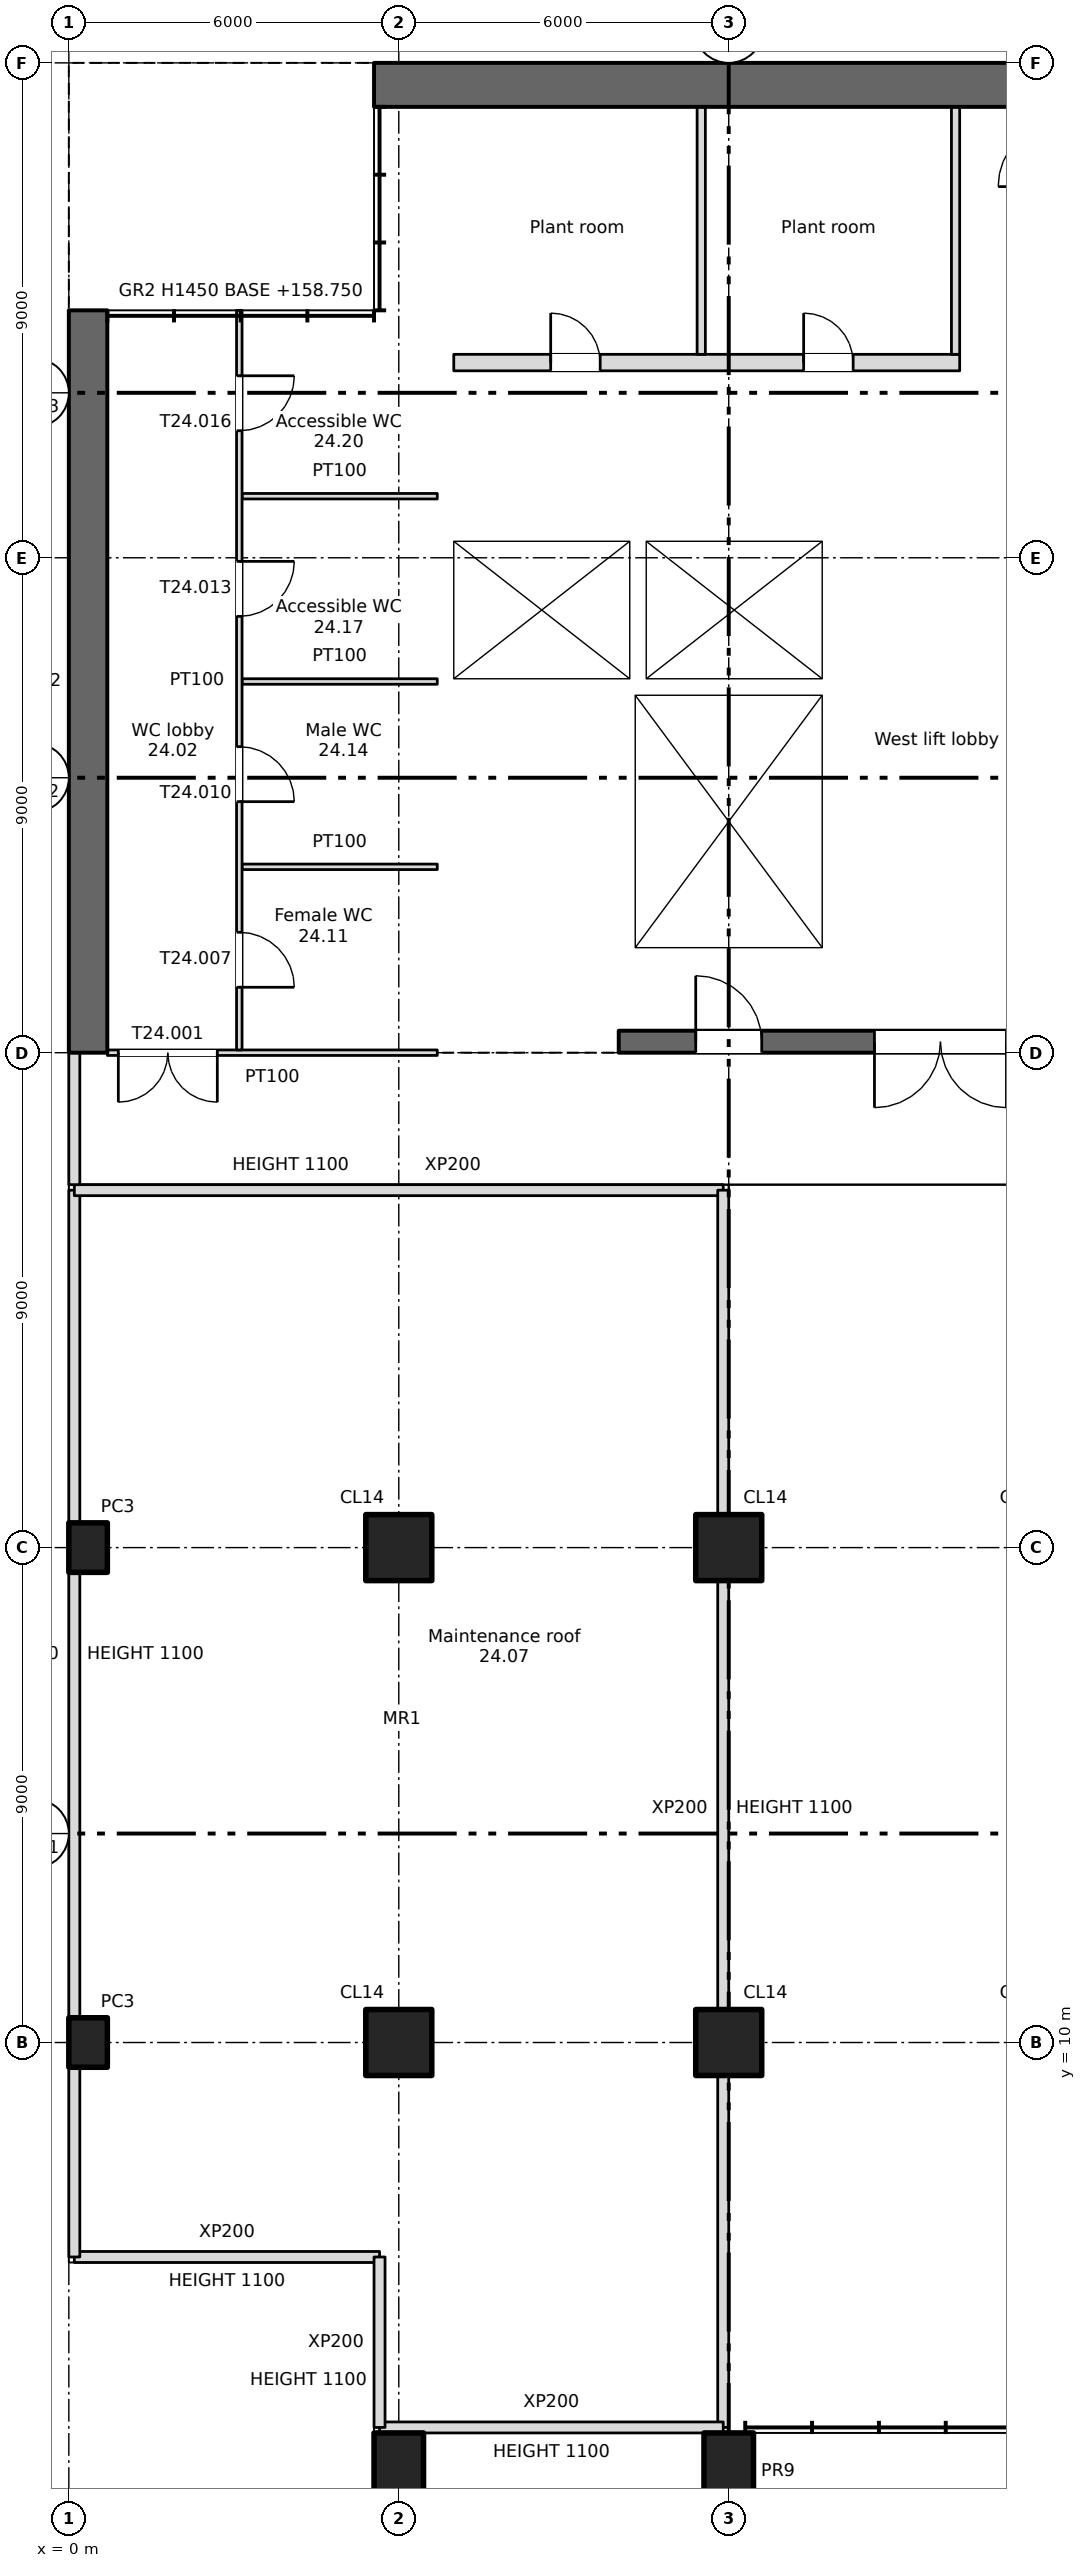
"""IFC4 building model, lengths in metres.
Left out: names, types, materials, properties, quantities, classifications, styles, units other than length and angle.
Written with IfcOpenShell. Run it as: python <this file> out.ifc"""

import sys

from ifc_helpers import new_model, si_unit, direction, frame, frame_2d, origin, origin_2d, place, context, subcontext, project, spatial, rectangle, extrude, element, fill, save


model = new_model("IFC4")
c1 = context("Model", 3, precision=1e-05, world=origin(), true_north=direction((0.0, 1.0)))
c2 = subcontext(c1, "Body", "Model", "MODEL_VIEW")
j1 = project(units=[si_unit("LENGTHUNIT", "METRE"), si_unit("PLANEANGLEUNIT", "RADIAN")], contexts=[c1])
p1 = place(None, origin())
s1 = spatial("IfcSite", under=j1, at=p1, CompositionType="ELEMENT")
p2 = place(p1, origin())
s2 = spatial("IfcBuilding", under=s1, at=p2, CompositionType="ELEMENT")
p3 = place(p2, frame((0.0, 0.0, 158.75)))
s3 = spatial("IfcBuildingStorey", under=s2, at=p3, CompositionType="ELEMENT", Elevation=158.75)
for number, where, z_axis, x_axis in (
    (1, (6.0, 2.2, -0.6), (0.0, 0.0, 1.0), (1.0, 0.0, 0.0)),
    (2, (12.0, 2.2, -0.6), (0.0, 0.0, 1.0), (1.0, 0.0, 0.0)),
):
    element("IfcColumn", number, at=place(p3, frame(where, z_axis=z_axis, x_axis=x_axis)), inside=s3, PredefinedType="COLUMN", context=c2, shape_type="SweptSolid", body=[
        extrude(rectangle(XDim=0.9, YDim=1.4, at=origin_2d()), origin(), (0.0, 0.0, 1.0), 7.8),
    ])
for number, where, z_axis, x_axis in (
    (3, (6.0, 10.0, 0.0), (0.0, 0.0, 1.0), (1.0, 0.0, 0.0)),
    (4, (6.0, 19.0, 0.0), (0.0, 0.0, 1.0), (1.0, 0.0, 0.0)),
    (5, (12.0, 10.0, 0.0), (0.0, 0.0, 1.0), (1.0, 0.0, 0.0)),
    (6, (12.0, 19.0, 0.0), (0.0, 0.0, 1.0), (1.0, 0.0, 0.0)),
):
    element("IfcColumn", number, at=place(p3, frame(where, z_axis=z_axis, x_axis=x_axis)), inside=s3, PredefinedType="COLUMN", context=c2, shape_type="SweptSolid", body=[
        extrude(rectangle(XDim=1.2, YDim=1.2, at=origin_2d()), origin(), (0.0, 0.0, 1.0), 7.2),
    ])
p4 = place(p3, frame((0.35, 28.0, 0.0), z_axis=(0.0, 0.0, 1.0), x_axis=(0.0, 1.0, 0.0)))
e7 = element("IfcWall", 7, at=p4, inside=s3, PredefinedType="SHEAR", context=c2, shape_type="SweptSolid", body=[
    extrude(rectangle(XDim=13.5, YDim=0.7, at=frame_2d((6.75, 0.0))), origin(), (0.0, 0.0, 1.0), 7.2),
])
p5 = place(p3, frame((5.55, 45.6, 0.0), z_axis=(0.0, 0.0, 1.0), x_axis=(1.0, 0.0, 0.0)))
e8 = element("IfcWall", 8, at=p5, inside=s3, PredefinedType="SHEAR", context=c2, shape_type="SweptSolid", body=[
    extrude(rectangle(XDim=60.9, YDim=0.8, at=frame_2d((30.45, 0.0))), origin(), (0.0, 0.0, 1.0), 7.2),
])
for number, where, z_axis, x_axis in (
    (9, (0.35, 10.0, 0.0), (0.0, 0.0, 1.0), (1.0, 0.0, 0.0)),
    (10, (0.35, 19.0, 0.0), (0.0, 0.0, 1.0), (1.0, 0.0, 0.0)),
):
    element("IfcColumn", number, at=place(p3, frame(where, z_axis=z_axis, x_axis=x_axis)), inside=s3, PredefinedType="COLUMN", context=c2, shape_type="SweptSolid", body=[
        extrude(rectangle(XDim=0.7, YDim=0.9, at=origin_2d()), origin(), (0.0, 0.0, 1.0), 7.2),
    ])
p6 = place(p3, frame((6.85, 28.0, 0.0), z_axis=(0.0, 0.0, 1.0), x_axis=(0.0, 1.0, 0.0)))
e11 = element("IfcWall", 11, at=p6, inside=s3, PredefinedType="SHEAR", context=c2, shape_type="SweptSolid", body=[
    extrude(rectangle(XDim=0.4, YDim=0.3, at=frame_2d((0.2, 0.0))), origin(), (0.0, 0.0, 1.0), 7.2),
])
p7 = place(p3, frame((10.0, 28.2, 0.0), z_axis=(0.0, 0.0, 1.0), x_axis=(1.0, 0.0, 0.0)))
e12 = element("IfcWall", 12, at=p7, inside=s3, PredefinedType="SHEAR", context=c2, shape_type="SweptSolid", body=[
    extrude(rectangle(XDim=8.5, YDim=0.4, at=frame_2d((4.25, 0.0))), origin(), (0.0, 0.0, 1.0), 7.2),
])
p8 = place(p7, frame((1.4, 0.0, 0.0)))
e13 = element("IfcOpeningElement", 13, at=p8, cuts=e12, PredefinedType="OPENING", context=c2, shape_type="SweptSolid", body=[
    extrude(rectangle(XDim=1.2, YDim=2.1, at=frame_2d((0.6, 1.05))), frame((0.0, 0.21, 0.0), z_axis=(0.0, -1.0, 0.0), x_axis=(1.0, 0.0, 0.0)), (0.0, 0.0, 1.0), 0.42),
])
p9 = place(p7, frame((4.65, 0.0, 0.0)))
e14 = element("IfcOpeningElement", 14, at=p9, cuts=e12, PredefinedType="OPENING", context=c2, shape_type="SweptSolid", body=[
    extrude(rectangle(XDim=2.4, YDim=2.1, at=frame_2d((1.2, 1.05))), frame((0.0, 0.21, 0.0), z_axis=(0.0, -1.0, 0.0), x_axis=(1.0, 0.0, 0.0)), (0.0, 0.0, 1.0), 0.42),
])
p10 = place(p3, frame((6.85, 28.4, 0.0), z_axis=(0.0, 0.0, 1.0), x_axis=(0.0, 1.0, 0.0)))
e15 = element("IfcWall", 15, at=p10, inside=s3, PredefinedType="SHEAR", context=c2, shape_type="SweptSolid", body=[
    extrude(rectangle(XDim=16.8, YDim=0.3, at=frame_2d((8.4, 0.0))), origin(), (0.0, 0.0, 1.0), 7.2),
])
for number, where, z_axis, x_axis in (
    (16, (10.15, 28.4, 0.0), (0.0, 0.0, 1.0), (0.0, 1.0, 0.0)),
    (17, (13.85, 28.4, 0.0), (0.0, 0.0, 1.0), (0.0, 1.0, 0.0)),
):
    element("IfcWall", number, at=place(p3, frame(where, z_axis=z_axis, x_axis=x_axis)), inside=s3, PredefinedType="SHEAR", context=c2, shape_type="SweptSolid", body=[
        extrude(rectangle(XDim=6.1, YDim=0.3, at=frame_2d((3.05, 0.0))), origin(), (0.0, 0.0, 1.0), 7.2),
    ])
for number, where, z_axis, x_axis in (
    (18, (7.0, 34.65, 0.0), (0.0, 0.0, 1.0), (1.0, 0.0, 0.0)),
    (19, (7.0, 37.45, 0.0), (0.0, 0.0, 1.0), (1.0, 0.0, 0.0)),
):
    element("IfcWall", number, at=place(p3, frame(where, z_axis=z_axis, x_axis=x_axis)), inside=s3, PredefinedType="SHEAR", context=c2, shape_type="SweptSolid", body=[
        extrude(rectangle(XDim=7.0, YDim=0.3, at=frame_2d((3.5, 0.0))), origin(), (0.0, 0.0, 1.0), 7.2),
    ])
p11 = place(p3, frame((13.85, 34.8, 0.0), z_axis=(0.0, 0.0, 1.0), x_axis=(0.0, 1.0, 0.0)))
e20 = element("IfcWall", 20, at=p11, inside=s3, PredefinedType="SHEAR", context=c2, shape_type="SweptSolid", body=[
    extrude(rectangle(XDim=2.5, YDim=0.3, at=frame_2d((1.25, 0.0))), origin(), (0.0, 0.0, 1.0), 7.2),
])
p12 = place(p3, frame((7.0, 40.55, 0.0), z_axis=(0.0, 0.0, 1.0), x_axis=(1.0, 0.0, 0.0)))
e21 = element("IfcWall", 21, at=p12, inside=s3, PredefinedType="PARTITIONING", context=c2, shape_type="SweptSolid", body=[
    extrude(rectangle(XDim=9.2, YDim=0.3, at=frame_2d((4.6, 0.0))), origin(), (0.0, 0.0, 1.0), 7.2),
])
p13 = place(p12, frame((1.762, 0.0, 0.0)))
e22 = element("IfcOpeningElement", 22, at=p13, cuts=e21, PredefinedType="OPENING", context=c2, shape_type="SweptSolid", body=[
    extrude(rectangle(XDim=0.9, YDim=2.1, at=frame_2d((0.45, 1.05))), frame((0.0, 0.16, 0.0), z_axis=(0.0, -1.0, 0.0), x_axis=(1.0, 0.0, 0.0)), (0.0, 0.0, 1.0), 0.32),
])
p14 = place(p12, frame((6.363, 0.0, 0.0)))
e23 = element("IfcOpeningElement", 23, at=p14, cuts=e21, PredefinedType="OPENING", context=c2, shape_type="SweptSolid", body=[
    extrude(rectangle(XDim=0.9, YDim=2.1, at=frame_2d((0.45, 1.05))), frame((0.0, 0.16, 0.0), z_axis=(0.0, -1.0, 0.0), x_axis=(1.0, 0.0, 0.0)), (0.0, 0.0, 1.0), 0.32),
])
p15 = place(p3, frame((10.35, 34.8, 0.0), z_axis=(0.0, 0.0, 1.0), x_axis=(0.0, 1.0, 0.0)))
e24 = element("IfcWall", 24, at=p15, inside=s3, PredefinedType="SHEAR", context=c2, shape_type="SweptSolid", body=[
    extrude(rectangle(XDim=2.5, YDim=0.3, at=frame_2d((1.25, 0.0))), origin(), (0.0, 0.0, 1.0), 7.2),
])
for number, where, z_axis, x_axis in (
    (25, (16.125, 40.7, 0.0), (0.0, 0.0, 1.0), (0.0, 1.0, 0.0)),
    (26, (11.5, 40.7, 0.0), (0.0, 0.0, 1.0), (0.0, 1.0, 0.0)),
):
    element("IfcWall", number, at=place(p3, frame(where, z_axis=z_axis, x_axis=x_axis)), inside=s3, PredefinedType="PARTITIONING", context=c2, shape_type="SweptSolid", body=[
        extrude(rectangle(XDim=4.5, YDim=0.15, at=frame_2d((2.25, 0.0))), origin(), (0.0, 0.0, 1.0), 7.2),
    ])
p16 = place(p3, frame((0.7, 28.0, 0.0), z_axis=(0.0, 0.0, 1.0), x_axis=(1.0, 0.0, 0.0)))
e27 = element("IfcWall", 27, at=p16, inside=s3, PredefinedType="PARTITIONING", context=c2, shape_type="SweptSolid", body=[
    extrude(rectangle(XDim=6.0, YDim=0.1, at=frame_2d((3.0, 0.0))), origin(), (0.0, 0.0, 1.0), 7.2),
])
p17 = place(p16, frame((0.2, 0.0, 0.0)))
e28 = element("IfcOpeningElement", 28, at=p17, cuts=e27, PredefinedType="OPENING", context=c2, shape_type="SweptSolid", body=[
    extrude(rectangle(XDim=1.8, YDim=2.1, at=frame_2d((0.9, 1.05))), frame((0.0, 0.06, 0.0), z_axis=(0.0, -1.0, 0.0), x_axis=(1.0, 0.0, 0.0)), (0.0, 0.0, 1.0), 0.12),
])
for number, where, z_axis, x_axis in (
    (29, (3.15, 31.38, 0.0), (0.0, 0.0, 1.0), (1.0, 0.0, 0.0)),
    (30, (3.15, 34.75, 0.0), (0.0, 0.0, 1.0), (1.0, 0.0, 0.0)),
    (31, (3.15, 38.12, 0.0), (0.0, 0.0, 1.0), (1.0, 0.0, 0.0)),
):
    element("IfcWall", number, at=place(p3, frame(where, z_axis=z_axis, x_axis=x_axis)), inside=s3, PredefinedType="PARTITIONING", context=c2, shape_type="SweptSolid", body=[
        extrude(rectangle(XDim=3.55, YDim=0.1, at=frame_2d((1.775, 0.0))), origin(), (0.0, 0.0, 1.0), 7.2),
    ])
p18 = place(p3, frame((3.1, 28.05, 0.0), z_axis=(0.0, 0.0, 1.0), x_axis=(0.0, 1.0, 0.0)))
e32 = element("IfcWall", 32, at=p18, inside=s3, PredefinedType="PARTITIONING", context=c2, shape_type="SweptSolid", body=[
    extrude(rectangle(XDim=13.45, YDim=0.1, at=frame_2d((6.725, 0.0))), origin(), (0.0, 0.0, 1.0), 7.2),
])
p19 = place(p18, frame((1.14, 0.0, 0.0)))
e33 = element("IfcOpeningElement", 33, at=p19, cuts=e32, PredefinedType="OPENING", context=c2, shape_type="SweptSolid", body=[
    extrude(rectangle(XDim=1.0, YDim=2.1, at=frame_2d((0.5, 1.05))), frame((0.0, 0.06, 0.0), z_axis=(0.0, -1.0, 0.0), x_axis=(1.0, 0.0, 0.0)), (0.0, 0.0, 1.0), 0.12),
])
p20 = place(p18, frame((4.515, 0.0, 0.0)))
e34 = element("IfcOpeningElement", 34, at=p20, cuts=e32, PredefinedType="OPENING", context=c2, shape_type="SweptSolid", body=[
    extrude(rectangle(XDim=1.0, YDim=2.1, at=frame_2d((0.5, 1.05))), frame((0.0, 0.06, 0.0), z_axis=(0.0, -1.0, 0.0), x_axis=(1.0, 0.0, 0.0)), (0.0, 0.0, 1.0), 0.12),
])
p21 = place(p18, frame((7.885, 0.0, 0.0)))
e35 = element("IfcOpeningElement", 35, at=p21, cuts=e32, PredefinedType="OPENING", context=c2, shape_type="SweptSolid", body=[
    extrude(rectangle(XDim=1.0, YDim=2.1, at=frame_2d((0.5, 1.05))), frame((0.0, 0.06, 0.0), z_axis=(0.0, -1.0, 0.0), x_axis=(1.0, 0.0, 0.0)), (0.0, 0.0, 1.0), 0.12),
])
p22 = place(p18, frame((11.26, 0.0, 0.0)))
e36 = element("IfcOpeningElement", 36, at=p22, cuts=e32, PredefinedType="OPENING", context=c2, shape_type="SweptSolid", body=[
    extrude(rectangle(XDim=1.0, YDim=2.1, at=frame_2d((0.5, 1.05))), frame((0.0, 0.06, 0.0), z_axis=(0.0, -1.0, 0.0), x_axis=(1.0, 0.0, 0.0)), (0.0, 0.0, 1.0), 0.12),
])
p23 = place(p3, frame((5.65, 6.1, 0.0), z_axis=(0.0, 0.0, 1.0), x_axis=(-1.0, 0.0, 0.0)))
e37 = element("IfcWall", 37, at=p23, inside=s3, PredefinedType="PARTITIONING", context=c2, shape_type="SweptSolid", body=[
    extrude(rectangle(XDim=5.55, YDim=0.2, at=frame_2d((2.775, 0.0))), origin(), (0.0, 0.0, 1.0), 1.1),
])
p24 = place(p3, frame((0.1, 6.1, 0.0), z_axis=(0.0, 0.0, 1.0), x_axis=(0.0, 1.0, 0.0)))
e38 = element("IfcWall", 38, at=p24, inside=s3, PredefinedType="PARTITIONING", context=c2, shape_type="SweptSolid", body=[
    extrude(rectangle(XDim=19.4, YDim=0.2, at=frame_2d((9.7, 0.0))), origin(), (0.0, 0.0, 1.0), 1.1),
])
p25 = place(p3, frame((0.1, 25.5, 0.0), z_axis=(0.0, 0.0, 1.0), x_axis=(1.0, 0.0, 0.0)))
e39 = element("IfcWall", 39, at=p25, inside=s3, PredefinedType="PARTITIONING", context=c2, shape_type="SweptSolid", body=[
    extrude(rectangle(XDim=11.8, YDim=0.2, at=frame_2d((5.9, 0.0))), origin(), (0.0, 0.0, 1.0), 1.1),
])
p26 = place(p3, frame((11.9, 25.5, 0.0), z_axis=(0.0, 0.0, 1.0), x_axis=(0.0, -1.0, 0.0)))
e40 = element("IfcWall", 40, at=p26, inside=s3, PredefinedType="PARTITIONING", context=c2, shape_type="SweptSolid", body=[
    extrude(rectangle(XDim=22.5, YDim=0.2, at=frame_2d((11.25, 0.0))), origin(), (0.0, 0.0, 1.0), 1.1),
])
p27 = place(p3, frame((11.9, 3.0, 0.0), z_axis=(0.0, 0.0, 1.0), x_axis=(-1.0, 0.0, 0.0)))
e41 = element("IfcWall", 41, at=p27, inside=s3, PredefinedType="PARTITIONING", context=c2, shape_type="SweptSolid", body=[
    extrude(rectangle(XDim=6.25, YDim=0.2, at=frame_2d((3.125, 0.0))), origin(), (0.0, 0.0, 1.0), 1.1),
])
p28 = place(p3, frame((5.65, 3.0, 0.0), z_axis=(0.0, 0.0, 1.0), x_axis=(0.0, 1.0, 0.0)))
e42 = element("IfcWall", 42, at=p28, inside=s3, PredefinedType="PARTITIONING", context=c2, shape_type="SweptSolid", body=[
    extrude(rectangle(XDim=3.1, YDim=0.2, at=frame_2d((1.55, 0.0))), origin(), (0.0, 0.0, 1.0), 1.1),
])
p29 = place(p3, frame((0.1, 25.6, 0.0), z_axis=(0.0, 0.0, 1.0), x_axis=(0.0, 1.0, 0.0)))
e43 = element("IfcWall", 43, at=p29, inside=s3, PredefinedType="PARTITIONING", context=c2, shape_type="SweptSolid", body=[
    extrude(rectangle(XDim=2.4, YDim=0.2, at=frame_2d((1.2, 0.0))), origin(), (0.0, 0.0, 1.0), 1.1),
])
p30 = place(p13, origin())
e44 = element("IfcDoor", 44, at=p30, inside=s3, OperationType="SINGLE_SWING_LEFT", PredefinedType="DOOR", context=c2, shape_type="SweptSolid", body=[
    extrude(rectangle(XDim=0.9, YDim=2.1, at=frame_2d((0.45, 1.05))), frame((0.0, 0.025, 0.0), z_axis=(0.0, -1.0, 0.0), x_axis=(1.0, 0.0, 0.0)), (0.0, 0.0, 1.0), 0.05),
])
fill(e22, e44)
p31 = place(p14, origin())
e45 = element("IfcDoor", 45, at=p31, inside=s3, OperationType="SINGLE_SWING_LEFT", PredefinedType="DOOR", context=c2, shape_type="SweptSolid", body=[
    extrude(rectangle(XDim=0.9, YDim=2.1, at=frame_2d((0.45, 1.05))), frame((0.0, 0.025, 0.0), z_axis=(0.0, -1.0, 0.0), x_axis=(1.0, 0.0, 0.0)), (0.0, 0.0, 1.0), 0.05),
])
fill(e23, e45)
p32 = place(p8, origin())
e46 = element("IfcDoor", 46, at=p32, inside=s3, OperationType="SINGLE_SWING_LEFT", PredefinedType="DOOR", context=c2, shape_type="SweptSolid", body=[
    extrude(rectangle(XDim=1.2, YDim=2.1, at=frame_2d((0.6, 1.05))), frame((0.0, 0.025, 0.0), z_axis=(0.0, -1.0, 0.0), x_axis=(1.0, 0.0, 0.0)), (0.0, 0.0, 1.0), 0.05),
])
fill(e13, e46)
p33 = place(p9, origin())
e47 = element("IfcDoor", 47, at=p33, inside=s3, OperationType="DOUBLE_DOOR_SINGLE_SWING", PredefinedType="DOOR", context=c2, shape_type="SweptSolid", body=[
    extrude(rectangle(XDim=2.4, YDim=2.1, at=frame_2d((1.2, 1.05))), frame((0.0, 0.025, 0.0), z_axis=(0.0, -1.0, 0.0), x_axis=(1.0, 0.0, 0.0)), (0.0, 0.0, 1.0), 0.05),
])
fill(e14, e47)
p34 = place(p17, origin())
e48 = element("IfcDoor", 48, at=p34, inside=s3, OperationType="DOUBLE_DOOR_SINGLE_SWING", PredefinedType="DOOR", context=c2, shape_type="SweptSolid", body=[
    extrude(rectangle(XDim=1.8, YDim=2.1, at=frame_2d((0.9, 1.05))), frame((0.0, 0.025, 0.0), z_axis=(0.0, -1.0, 0.0), x_axis=(1.0, 0.0, 0.0)), (0.0, 0.0, 1.0), 0.05),
])
fill(e28, e48)
p35 = place(p19, origin())
e49 = element("IfcDoor", 49, at=p35, inside=s3, OperationType="SINGLE_SWING_LEFT", PredefinedType="DOOR", context=c2, shape_type="SweptSolid", body=[
    extrude(rectangle(XDim=1.0, YDim=2.1, at=frame_2d((0.5, 1.05))), frame((0.0, 0.025, 0.0), z_axis=(0.0, -1.0, 0.0), x_axis=(1.0, 0.0, 0.0)), (0.0, 0.0, 1.0), 0.05),
])
fill(e33, e49)
p36 = place(p20, origin())
e50 = element("IfcDoor", 50, at=p36, inside=s3, OperationType="SINGLE_SWING_LEFT", PredefinedType="DOOR", context=c2, shape_type="SweptSolid", body=[
    extrude(rectangle(XDim=1.0, YDim=2.1, at=frame_2d((0.5, 1.05))), frame((0.0, 0.025, 0.0), z_axis=(0.0, -1.0, 0.0), x_axis=(1.0, 0.0, 0.0)), (0.0, 0.0, 1.0), 0.05),
])
fill(e34, e50)
p37 = place(p21, origin())
e51 = element("IfcDoor", 51, at=p37, inside=s3, OperationType="SINGLE_SWING_RIGHT", PredefinedType="DOOR", context=c2, shape_type="SweptSolid", body=[
    extrude(rectangle(XDim=1.0, YDim=2.1, at=frame_2d((0.5, 1.05))), frame((0.0, 0.025, 0.0), z_axis=(0.0, -1.0, 0.0), x_axis=(1.0, 0.0, 0.0)), (0.0, 0.0, 1.0), 0.05),
])
fill(e35, e51)
p38 = place(p22, origin())
e52 = element("IfcDoor", 52, at=p38, inside=s3, OperationType="SINGLE_SWING_RIGHT", PredefinedType="DOOR", context=c2, shape_type="SweptSolid", body=[
    extrude(rectangle(XDim=1.0, YDim=2.1, at=frame_2d((0.5, 1.05))), frame((0.0, 0.025, 0.0), z_axis=(0.0, -1.0, 0.0), x_axis=(1.0, 0.0, 0.0)), (0.0, 0.0, 1.0), 0.05),
])
fill(e36, e52)
save(model, sys.argv[1])
